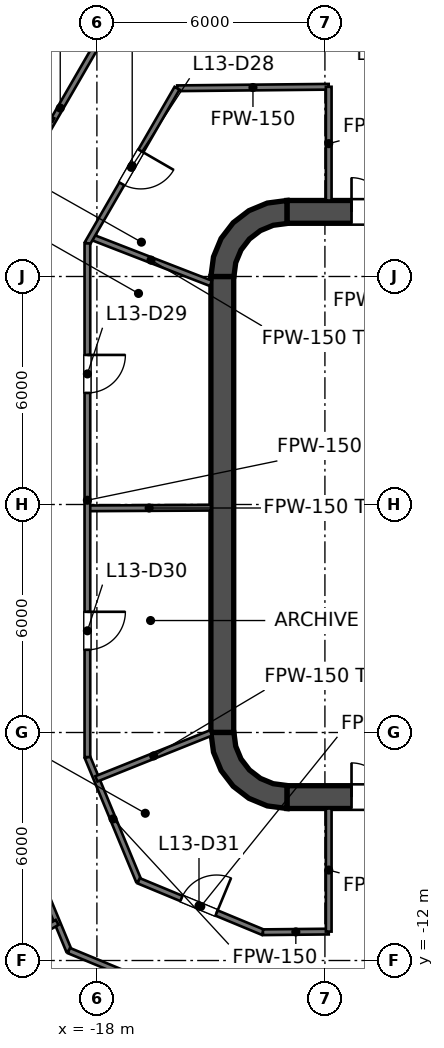
"""IFC4 building model, lengths in metres.
Left out: names, types, materials, properties, quantities, classifications, styles, units other than length and angle.
Written with IfcOpenShell. Run it as: python <this file> out.ifc"""

import sys

from ifc_helpers import new_model, si_unit, direction, frame, frame_2d, origin, place, context, subcontext, project, spatial, polyline, rectangle, outline, extrude, element, fill, save


model = new_model("IFC4")
c1 = context("Model", 3, precision=1e-05, world=origin(), true_north=direction((0.0, 1.0)))
c2 = subcontext(c1, "Body", "Model", "MODEL_VIEW")
j1 = project(units=[si_unit("LENGTHUNIT", "METRE"), si_unit("PLANEANGLEUNIT", "RADIAN")], contexts=[c1])
p1 = place(None, origin())
s1 = spatial("IfcSite", under=j1, at=p1, CompositionType="ELEMENT")
p2 = place(p1, origin())
s2 = spatial("IfcBuilding", under=s1, at=p2, CompositionType="ELEMENT")
p3 = place(p2, frame((0.0, 0.0, 75.6)))
s3 = spatial("IfcBuildingStorey", under=s2, at=p3, CompositionType="ELEMENT", Elevation=75.6)
p4 = place(p3, frame((-13.0, 7.7, 0.0), z_axis=(0.0, 0.0, 1.0), x_axis=(1.0, 0.0, 0.0)))
e1 = element("IfcWall", 1, at=p4, inside=s3, PredefinedType="SHEAR", context=c2, shape_type="SweptSolid", body=[
    extrude(rectangle(XDim=26.0, YDim=0.6, at=frame_2d((13.0, 0.0))), origin(), (0.0, 0.0, 1.0), 4.2),
])
p5 = place(p4, frame((1.7, 0.0, 0.0)))
e2 = element("IfcOpeningElement", 2, at=p5, cuts=e1, PredefinedType="OPENING", context=c2, shape_type="SweptSolid", body=[
    extrude(rectangle(XDim=1.8, YDim=2.1, at=frame_2d((0.9, 1.05))), frame((0.0, 0.3, 0.0), z_axis=(0.0, -1.0, 0.0), x_axis=(1.0, 0.0, 0.0)), (0.0, 0.0, 1.0), 0.6),
])
p6 = place(p4, frame((22.5, 0.0, 0.0)))
e3 = element("IfcOpeningElement", 3, at=p6, cuts=e1, PredefinedType="OPENING", context=c2, shape_type="SweptSolid", body=[
    extrude(rectangle(XDim=1.8, YDim=2.1, at=frame_2d((0.9, 1.05))), frame((0.0, 0.3, 0.0), z_axis=(0.0, -1.0, 0.0), x_axis=(1.0, 0.0, 0.0)), (0.0, 0.0, 1.0), 0.6),
])
p7 = place(p3, frame((-13.0, -7.7, 0.0), z_axis=(0.0, 0.0, 1.0), x_axis=(1.0, 0.0, 0.0)))
e4 = element("IfcWall", 4, at=p7, inside=s3, PredefinedType="SHEAR", context=c2, shape_type="SweptSolid", body=[
    extrude(rectangle(XDim=26.0, YDim=0.6, at=frame_2d((13.0, 0.0))), origin(), (0.0, 0.0, 1.0), 4.2),
])
p8 = place(p7, frame((1.7, 0.0, 0.0)))
e5 = element("IfcOpeningElement", 5, at=p8, cuts=e4, PredefinedType="OPENING", context=c2, shape_type="SweptSolid", body=[
    extrude(rectangle(XDim=1.8, YDim=2.1, at=frame_2d((0.9, 1.05))), frame((0.0, 0.3, 0.0), z_axis=(0.0, -1.0, 0.0), x_axis=(1.0, 0.0, 0.0)), (0.0, 0.0, 1.0), 0.6),
])
p9 = place(p7, frame((22.5, 0.0, 0.0)))
e6 = element("IfcOpeningElement", 6, at=p9, cuts=e4, PredefinedType="OPENING", context=c2, shape_type="SweptSolid", body=[
    extrude(rectangle(XDim=1.8, YDim=2.1, at=frame_2d((0.9, 1.05))), frame((0.0, 0.3, 0.0), z_axis=(0.0, -1.0, 0.0), x_axis=(1.0, 0.0, 0.0)), (0.0, 0.0, 1.0), 0.6),
])
p10 = place(p3, frame((-14.7, -6.0, 0.0), z_axis=(0.0, 0.0, 1.0), x_axis=(0.0, 1.0, 0.0)))
e7 = element("IfcWall", 7, at=p10, inside=s3, PredefinedType="SHEAR", context=c2, shape_type="SweptSolid", body=[
    extrude(rectangle(XDim=12.0, YDim=0.6, at=frame_2d((6.0, 0.0))), origin(), (0.0, 0.0, 1.0), 4.2),
])
p11 = place(p3, origin())
e8 = element("IfcWall", 8, at=p11, inside=s3, PredefinedType="SHEAR", context=c2, shape_type="SweptSolid", body=[
    extrude(outline(polyline([(-15.0, 6.0), (-14.395, 6.0), (-14.347, 6.361), (-14.208, 6.698), (-13.986, 6.986), (-13.698, 7.208), (-13.361, 7.347), (-13.0, 7.395), (-13.0, 8.0), (-13.518, 7.932), (-14.0, 7.732), (-14.414, 7.414), (-14.732, 7.0), (-14.932, 6.518), (-15.0, 6.0)])), origin(), (0.0, 0.0, 1.0), 4.2),
])
e9 = element("IfcWall", 9, at=p11, inside=s3, PredefinedType="SHEAR", context=c2, shape_type="SweptSolid", body=[
    extrude(outline(polyline([(-13.0, -8.0), (-13.0, -7.395), (-13.361, -7.347), (-13.698, -7.208), (-13.986, -6.986), (-14.208, -6.698), (-14.347, -6.361), (-14.395, -6.0), (-15.0, -6.0), (-14.932, -6.518), (-14.732, -7.0), (-14.414, -7.414), (-14.0, -7.732), (-13.518, -7.932), (-13.0, -8.0)])), origin(), (0.0, 0.0, 1.0), 4.2),
])
p12 = place(p3, frame((-11.8, -7.4, 0.0), z_axis=(0.0, 0.0, 1.0), x_axis=(0.0, 1.0, 0.0)))
e10 = element("IfcWall", 10, at=p12, inside=s3, PredefinedType="SOLIDWALL", context=c2, shape_type="SweptSolid", body=[
    extrude(rectangle(XDim=14.8, YDim=0.4, at=frame_2d((7.4, 0.0))), origin(), (0.0, 0.0, 1.0), 4.05),
])
p13 = place(p12, frame((11.2, 0.0, 0.0)))
e11 = element("IfcOpeningElement", 11, at=p13, cuts=e10, PredefinedType="OPENING", context=c2, shape_type="SweptSolid", body=[
    extrude(rectangle(XDim=1.1, YDim=2.1, at=frame_2d((0.55, 1.05))), frame((0.0, 0.2, 0.0), z_axis=(0.0, -1.0, 0.0), x_axis=(1.0, 0.0, 0.0)), (0.0, 0.0, 1.0), 0.4),
])
p14 = place(p12, frame((8.3, 0.0, 0.0)))
e12 = element("IfcOpeningElement", 12, at=p14, cuts=e10, PredefinedType="OPENING", context=c2, shape_type="SweptSolid", body=[
    extrude(rectangle(XDim=1.1, YDim=2.1, at=frame_2d((0.55, 1.05))), frame((0.0, 0.2, 0.0), z_axis=(0.0, -1.0, 0.0), x_axis=(1.0, 0.0, 0.0)), (0.0, 0.0, 1.0), 0.4),
])
p15 = place(p12, frame((5.4, 0.0, 0.0)))
e13 = element("IfcOpeningElement", 13, at=p15, cuts=e10, PredefinedType="OPENING", context=c2, shape_type="SweptSolid", body=[
    extrude(rectangle(XDim=1.1, YDim=2.1, at=frame_2d((0.55, 1.05))), frame((0.0, 0.2, 0.0), z_axis=(0.0, -1.0, 0.0), x_axis=(1.0, 0.0, 0.0)), (0.0, 0.0, 1.0), 0.4),
])
p16 = place(p12, frame((13.552, 0.0, 0.0)))
e14 = element("IfcOpeningElement", 14, at=p16, cuts=e10, PredefinedType="OPENING", context=c2, shape_type="SweptSolid", body=[
    extrude(rectangle(XDim=0.9, YDim=2.1, at=frame_2d((0.45, 1.05))), frame((0.0, 0.2, 0.0), z_axis=(0.0, -1.0, 0.0), x_axis=(1.0, 0.0, 0.0)), (0.0, 0.0, 1.0), 0.4),
])
p17 = place(p12, frame((0.347, 0.0, 0.0)))
e15 = element("IfcOpeningElement", 15, at=p17, cuts=e10, PredefinedType="OPENING", context=c2, shape_type="SweptSolid", body=[
    extrude(rectangle(XDim=0.9, YDim=2.1, at=frame_2d((0.45, 1.05))), frame((0.0, 0.2, 0.0), z_axis=(0.0, -1.0, 0.0), x_axis=(1.0, 0.0, 0.0)), (0.0, 0.0, 1.0), 0.4),
])
e16 = element("IfcWall", 16, at=p11, inside=s3, PredefinedType="SOLIDWALL", context=c2, shape_type="SweptSolid", body=[
    extrude(outline(polyline([(-12.0, -5.925), (-12.0, -5.675), (-14.15, -5.675), (-14.15, -3.025), (-12.0, -3.025), (-12.0, -2.775), (-14.15, -2.775), (-14.15, -0.125), (-12.0, -0.125), (-12.0, 0.125), (-14.15, 0.125), (-14.15, 2.775), (-12.0, 2.775), (-12.0, 3.025), (-14.15, 3.025), (-14.15, 5.675), (-12.0, 5.675), (-12.0, 5.925), (-14.15, 5.925), (-14.4, 5.925), (-14.4, 5.675), (-14.4, 3.025), (-14.4, 2.775), (-14.4, 0.125), (-14.4, -0.125), (-14.4, -2.775), (-14.4, -3.025), (-14.4, -5.675), (-14.4, -5.925), (-14.15, -5.925), (-12.0, -5.925)])), origin(), (0.0, 0.0, 1.0), 4.05),
])
p18 = place(p3, frame((-20.65, -7.124, 0.0), z_axis=(0.0, 0.0, 1.0), x_axis=(0.382941772901, -0.923772482036, 0.0)))
e17 = element("IfcWall", 17, at=p18, inside=s3, PredefinedType="PARTITIONING", context=c2, shape_type="SweptSolid", body=[
    extrude(rectangle(XDim=4.994, YDim=0.15, at=frame_2d((2.497, 0.0))), origin(), (0.0, 0.0, 1.0), 3.195),
])
p19 = place(p18, frame((1.95, 0.0, 0.0)))
e18 = element("IfcOpeningElement", 18, at=p19, cuts=e17, PredefinedType="OPENING", context=c2, shape_type="SweptSolid", body=[
    extrude(rectangle(XDim=1.0, YDim=2.1, at=frame_2d((0.5, 1.05))), frame((0.0, 0.075, 0.0), z_axis=(0.0, -1.0, 0.0), x_axis=(1.0, 0.0, 0.0)), (0.0, 0.0, 1.0), 0.15),
])
p20 = place(p3, frame((-18.25, -6.647, 0.0), z_axis=(0.0, 0.0, 1.0), x_axis=(0.383000597973, -0.923748094424, 0.0)))
e19 = element("IfcWall", 19, at=p20, inside=s3, PredefinedType="PARTITIONING", context=c2, shape_type="SweptSolid", body=[
    extrude(rectangle(XDim=3.522, YDim=0.15, at=frame_2d((1.761, 0.0))), origin(), (0.0, 0.0, 1.0), 3.195),
])
p21 = place(p3, frame((-18.738, -11.738, 0.0), z_axis=(0.0, 0.0, 1.0), x_axis=(0.923848598814, -0.38275810438, 0.0)))
e20 = element("IfcWall", 20, at=p21, inside=s3, PredefinedType="PARTITIONING", context=c2, shape_type="SweptSolid", body=[
    extrude(rectangle(XDim=5.024, YDim=0.15, at=frame_2d((2.512, 0.0))), origin(), (0.0, 0.0, 1.0), 3.195),
])
p22 = place(p21, frame((2.012, 0.0, 0.0)))
e21 = element("IfcOpeningElement", 21, at=p22, cuts=e20, PredefinedType="OPENING", context=c2, shape_type="SweptSolid", body=[
    extrude(rectangle(XDim=1.0, YDim=2.1, at=frame_2d((0.5, 1.05))), frame((0.0, 0.075, 0.0), z_axis=(0.0, -1.0, 0.0), x_axis=(1.0, 0.0, 0.0)), (0.0, 0.0, 1.0), 0.15),
])
p23 = place(p3, frame((-16.901, -9.901, 0.0), z_axis=(0.0, 0.0, 1.0), x_axis=(0.923795674736, -0.382885820239, 0.0)))
e22 = element("IfcWall", 22, at=p23, inside=s3, PredefinedType="PARTITIONING", context=c2, shape_type="SweptSolid", body=[
    extrude(rectangle(XDim=3.54, YDim=0.15, at=frame_2d((1.77, 0.0))), origin(), (0.0, 0.0, 1.0), 3.195),
])
p24 = place(p23, frame((1.219, 0.0, 0.0)))
e23 = element("IfcOpeningElement", 23, at=p24, cuts=e22, PredefinedType="OPENING", context=c2, shape_type="SweptSolid", body=[
    extrude(rectangle(XDim=1.0, YDim=2.1, at=frame_2d((0.5, 1.05))), frame((0.0, 0.075, 0.0), z_axis=(0.0, -1.0, 0.0), x_axis=(1.0, 0.0, 0.0)), (0.0, 0.0, 1.0), 0.15),
])
p25 = place(p3, frame((-18.151, 7.042, 0.0), z_axis=(0.0, 0.0, 1.0), x_axis=(0.93232154811, -0.361630378881, 0.0)))
e24 = element("IfcWall", 24, at=p25, inside=s3, PredefinedType="PARTITIONING", context=c2, shape_type="SweptSolid", body=[
    extrude(rectangle(XDim=3.38, YDim=0.15, at=frame_2d((1.69, 0.0))), origin(), (0.0, 0.0, 1.0), 4.05),
])
p26 = place(p3, frame((-18.25, -0.101, 0.0), z_axis=(0.0, 0.0, 1.0), x_axis=(0.999985777013, 0.005333457795, 0.0)))
e25 = element("IfcWall", 25, at=p26, inside=s3, PredefinedType="PARTITIONING", context=c2, shape_type="SweptSolid", body=[
    extrude(rectangle(XDim=3.25, YDim=0.15, at=frame_2d((1.625, 0.0))), origin(), (0.0, 0.0, 1.0), 3.118),
])
p27 = place(p3, frame((-13.631, -11.256, 0.0), z_axis=(0.0, 0.0, 1.0), x_axis=(0.999949876767, 0.010012190276, 0.0)))
e26 = element("IfcWall", 26, at=p27, inside=s3, PredefinedType="PARTITIONING", context=c2, shape_type="SweptSolid", body=[
    extrude(rectangle(XDim=1.731, YDim=0.15, at=frame_2d((0.866, 0.0))), origin(), (0.0, 0.0, 1.0), 4.05),
])
p28 = place(p3, frame((-15.887, 10.953, 0.0), z_axis=(0.0, 0.0, 1.0), x_axis=(0.999950802569, 0.009919296431, 0.0)))
e27 = element("IfcWall", 27, at=p28, inside=s3, PredefinedType="PARTITIONING", context=c2, shape_type="SweptSolid", body=[
    extrude(rectangle(XDim=3.987, YDim=0.15, at=frame_2d((1.994, 0.0))), origin(), (0.0, 0.0, 1.0), 3.195),
])
p29 = place(p3, frame((-18.013, -7.219, 0.0), z_axis=(0.0, 0.0, 1.0), x_axis=(0.928305468463, 0.371818446586, 0.0)))
e28 = element("IfcWall", 28, at=p29, inside=s3, PredefinedType="PARTITIONING", context=c2, shape_type="SweptSolid", body=[
    extrude(rectangle(XDim=3.247, YDim=0.15, at=frame_2d((1.624, 0.0))), origin(), (0.0, 0.0, 1.0), 4.05),
])
p30 = place(p3, frame((-24.859, -14.352, 0.0), z_axis=(0.0, 0.0, 1.0), x_axis=(0.866036584562, 0.499980633826, 0.0)))
e29 = element("IfcWall", 29, at=p30, inside=s3, PredefinedType="PARTITIONING", context=c2, shape_type="SweptSolid", body=[
    extrude(rectangle(XDim=6.712, YDim=0.15, at=frame_2d((3.356, 0.0))), origin(), (0.0, 0.0, 1.0), 3.276),
])
p31 = place(p3, frame((-18.25, 6.871, 0.0), z_axis=(0.0, 0.0, 1.0), x_axis=(0.500254304961, 0.865878530955, 0.0)))
e30 = element("IfcWall", 30, at=p31, inside=s3, PredefinedType="PARTITIONING", context=c2, shape_type="SweptSolid", body=[
    extrude(rectangle(XDim=4.715, YDim=0.15, at=frame_2d((2.357, 0.0))), origin(), (0.0, 0.0, 1.0), 3.195),
])
p32 = place(p31, frame((1.81, 0.0, 0.0)))
e31 = element("IfcOpeningElement", 31, at=p32, cuts=e30, PredefinedType="OPENING", context=c2, shape_type="SweptSolid", body=[
    extrude(rectangle(XDim=1.0, YDim=2.1, at=frame_2d((0.5, 1.05))), frame((0.0, 0.075, 0.0), z_axis=(0.0, -1.0, 0.0), x_axis=(1.0, 0.0, 0.0)), (0.0, 0.0, 1.0), 0.15),
])
p33 = place(p3, frame((-20.65, 7.514, 0.0), z_axis=(0.0, 0.0, 1.0), x_axis=(0.500199125334, 0.865910408192, 0.0)))
e32 = element("IfcWall", 32, at=p33, inside=s3, PredefinedType="PARTITIONING", context=c2, shape_type="SweptSolid", body=[
    extrude(rectangle(XDim=6.739, YDim=0.15, at=frame_2d((3.369, 0.0))), origin(), (0.0, 0.0, 1.0), 3.195),
])
p34 = place(p33, frame((1.01, 0.0, 0.0)))
e33 = element("IfcOpeningElement", 33, at=p34, cuts=e32, PredefinedType="OPENING", context=c2, shape_type="SweptSolid", body=[
    extrude(rectangle(XDim=1.0, YDim=2.1, at=frame_2d((0.5, 1.05))), frame((0.0, 0.075, 0.0), z_axis=(0.0, -1.0, 0.0), x_axis=(1.0, 0.0, 0.0)), (0.0, 0.0, 1.0), 0.15),
])
p35 = place(p3, frame((-11.9, -11.239, 0.0), z_axis=(0.0, 0.0, 1.0), x_axis=(0.0, 1.0, 0.0)))
e34 = element("IfcWall", 34, at=p35, inside=s3, PredefinedType="PARTITIONING", context=c2, shape_type="SweptSolid", body=[
    extrude(rectangle(XDim=3.239, YDim=0.15, at=frame_2d((1.62, 0.0))), origin(), (0.0, 0.0, 1.0), 3.195),
])
p36 = place(p3, frame((-11.9, 8.0, 0.0), z_axis=(0.0, 0.0, 1.0), x_axis=(0.0, 1.0, 0.0)))
e35 = element("IfcWall", 35, at=p36, inside=s3, PredefinedType="PARTITIONING", context=c2, shape_type="SweptSolid", body=[
    extrude(rectangle(XDim=2.992, YDim=0.15, at=frame_2d((1.496, 0.0))), origin(), (0.0, 0.0, 1.0), 3.195),
])
p37 = place(p3, frame((-18.25, -6.647, 0.0), z_axis=(0.0, 0.0, 1.0), x_axis=(0.0, 1.0, 0.0)))
e36 = element("IfcWall", 36, at=p37, inside=s3, PredefinedType="PARTITIONING", context=c2, shape_type="SweptSolid", body=[
    extrude(rectangle(XDim=13.518, YDim=0.15, at=frame_2d((6.759, 0.0))), origin(), (0.0, 0.0, 1.0), 3.118),
])
p38 = place(p37, frame((9.583, 0.0, 0.0)))
e37 = element("IfcOpeningElement", 37, at=p38, cuts=e36, PredefinedType="OPENING", context=c2, shape_type="SweptSolid", body=[
    extrude(rectangle(XDim=1.0, YDim=2.1, at=frame_2d((0.5, 1.05))), frame((0.0, 0.075, 0.0), z_axis=(0.0, -1.0, 0.0), x_axis=(1.0, 0.0, 0.0)), (0.0, 0.0, 1.0), 0.15),
])
p39 = place(p37, frame((2.823, 0.0, 0.0)))
e38 = element("IfcOpeningElement", 38, at=p39, cuts=e36, PredefinedType="OPENING", context=c2, shape_type="SweptSolid", body=[
    extrude(rectangle(XDim=1.0, YDim=2.1, at=frame_2d((0.5, 1.05))), frame((0.0, 0.075, 0.0), z_axis=(0.0, -1.0, 0.0), x_axis=(1.0, 0.0, 0.0)), (0.0, 0.0, 1.0), 0.15),
])
p40 = place(p3, frame((-22.004, 11.629, 0.0), z_axis=(0.0, 0.0, 1.0), x_axis=(0.884171604481, -0.467162256426, 0.0)))
e39 = element("IfcWall", 39, at=p40, inside=s3, PredefinedType="PARTITIONING", context=c2, shape_type="SweptSolid", body=[
    extrude(rectangle(XDim=3.232, YDim=0.1, at=frame_2d((1.616, 0.0))), origin(), (0.0, 0.0, 1.0), 4.05),
])
p41 = place(p3, frame((-23.88, 8.379, 0.0), z_axis=(0.0, 0.0, 1.0), x_axis=(0.499871577197, 0.86609953603, 0.0)))
e40 = element("IfcWall", 40, at=p41, inside=s3, PredefinedType="PARTITIONING", context=c2, shape_type="SweptSolid", body=[
    extrude(rectangle(XDim=9.448, YDim=0.1, at=frame_2d((4.724, 0.0))), origin(), (0.0, 0.0, 1.0), 3.195),
])
p42 = place(p41, frame((4.325, 0.0, 0.0)))
e41 = element("IfcOpeningElement", 41, at=p42, cuts=e40, PredefinedType="OPENING", context=c2, shape_type="SweptSolid", body=[
    extrude(rectangle(XDim=0.9, YDim=2.1, at=frame_2d((0.45, 1.05))), frame((0.0, 0.05, 0.0), z_axis=(0.0, -1.0, 0.0), x_axis=(1.0, 0.0, 0.0)), (0.0, 0.0, 1.0), 0.1),
])
p43 = place(p13, origin())
e42 = element("IfcDoor", 42, at=p43, inside=s3, OperationType="DOUBLE_DOOR_SLIDING", PredefinedType="DOOR", context=c2, shape_type="SweptSolid", body=[
    extrude(rectangle(XDim=1.1, YDim=2.1, at=frame_2d((0.55, 1.05))), frame((0.0, 0.025, 0.0), z_axis=(0.0, -1.0, 0.0), x_axis=(1.0, 0.0, 0.0)), (0.0, 0.0, 1.0), 0.05),
])
fill(e11, e42)
p44 = place(p14, origin())
e43 = element("IfcDoor", 43, at=p44, inside=s3, OperationType="DOUBLE_DOOR_SLIDING", PredefinedType="DOOR", context=c2, shape_type="SweptSolid", body=[
    extrude(rectangle(XDim=1.1, YDim=2.1, at=frame_2d((0.55, 1.05))), frame((0.0, 0.025, 0.0), z_axis=(0.0, -1.0, 0.0), x_axis=(1.0, 0.0, 0.0)), (0.0, 0.0, 1.0), 0.05),
])
fill(e12, e43)
p45 = place(p15, origin())
e44 = element("IfcDoor", 44, at=p45, inside=s3, OperationType="DOUBLE_DOOR_SLIDING", PredefinedType="DOOR", context=c2, shape_type="SweptSolid", body=[
    extrude(rectangle(XDim=1.1, YDim=2.1, at=frame_2d((0.55, 1.05))), frame((0.0, 0.025, 0.0), z_axis=(0.0, -1.0, 0.0), x_axis=(1.0, 0.0, 0.0)), (0.0, 0.0, 1.0), 0.05),
])
fill(e13, e44)
p46 = place(p16, origin())
e45 = element("IfcDoor", 45, at=p46, inside=s3, OperationType="SINGLE_SWING_LEFT", PredefinedType="DOOR", context=c2, shape_type="SweptSolid", body=[
    extrude(rectangle(XDim=0.9, YDim=2.1, at=frame_2d((0.45, 1.05))), frame((0.0, 0.025, 0.0), z_axis=(0.0, -1.0, 0.0), x_axis=(1.0, 0.0, 0.0)), (0.0, 0.0, 1.0), 0.05),
])
fill(e14, e45)
p47 = place(p17, origin())
e46 = element("IfcDoor", 46, at=p47, inside=s3, OperationType="SINGLE_SWING_LEFT", PredefinedType="DOOR", context=c2, shape_type="SweptSolid", body=[
    extrude(rectangle(XDim=0.9, YDim=2.1, at=frame_2d((0.45, 1.05))), frame((0.0, 0.025, 0.0), z_axis=(0.0, -1.0, 0.0), x_axis=(1.0, 0.0, 0.0)), (0.0, 0.0, 1.0), 0.05),
])
fill(e15, e46)
p48 = place(p5, origin())
e47 = element("IfcDoor", 47, at=p48, inside=s3, OperationType="DOUBLE_DOOR_SINGLE_SWING", PredefinedType="DOOR", context=c2, shape_type="SweptSolid", body=[
    extrude(rectangle(XDim=1.8, YDim=2.1, at=frame_2d((0.9, 1.05))), frame((0.0, 0.025, 0.0), z_axis=(0.0, -1.0, 0.0), x_axis=(1.0, 0.0, 0.0)), (0.0, 0.0, 1.0), 0.05),
])
fill(e2, e47)
p49 = place(p8, origin())
e48 = element("IfcDoor", 48, at=p49, inside=s3, OperationType="DOUBLE_DOOR_SINGLE_SWING", PredefinedType="DOOR", context=c2, shape_type="SweptSolid", body=[
    extrude(rectangle(XDim=1.8, YDim=2.1, at=frame_2d((0.9, 1.05))), frame((0.0, 0.025, 0.0), z_axis=(0.0, -1.0, 0.0), x_axis=(1.0, 0.0, 0.0)), (0.0, 0.0, 1.0), 0.05),
])
fill(e5, e48)
p50 = place(p32, origin())
e49 = element("IfcDoor", 49, at=p50, inside=s3, OperationType="SINGLE_SWING_RIGHT", PredefinedType="DOOR", context=c2, shape_type="SweptSolid", body=[
    extrude(rectangle(XDim=1.0, YDim=2.1, at=frame_2d((0.5, 1.05))), frame((0.0, 0.025, 0.0), z_axis=(0.0, -1.0, 0.0), x_axis=(1.0, 0.0, 0.0)), (0.0, 0.0, 1.0), 0.05),
])
fill(e31, e49)
p51 = place(p38, origin())
e50 = element("IfcDoor", 50, at=p51, inside=s3, OperationType="SINGLE_SWING_RIGHT", PredefinedType="DOOR", context=c2, shape_type="SweptSolid", body=[
    extrude(rectangle(XDim=1.0, YDim=2.1, at=frame_2d((0.5, 1.05))), frame((0.0, 0.025, 0.0), z_axis=(0.0, -1.0, 0.0), x_axis=(1.0, 0.0, 0.0)), (0.0, 0.0, 1.0), 0.05),
])
fill(e37, e50)
p52 = place(p39, origin())
e51 = element("IfcDoor", 51, at=p52, inside=s3, OperationType="SINGLE_SWING_RIGHT", PredefinedType="DOOR", context=c2, shape_type="SweptSolid", body=[
    extrude(rectangle(XDim=1.0, YDim=2.1, at=frame_2d((0.5, 1.05))), frame((0.0, 0.025, 0.0), z_axis=(0.0, -1.0, 0.0), x_axis=(1.0, 0.0, 0.0)), (0.0, 0.0, 1.0), 0.05),
])
fill(e38, e51)
p53 = place(p24, origin())
e52 = element("IfcDoor", 52, at=p53, inside=s3, OperationType="SINGLE_SWING_RIGHT", PredefinedType="DOOR", context=c2, shape_type="SweptSolid", body=[
    extrude(rectangle(XDim=1.0, YDim=2.1, at=frame_2d((0.5, 1.05))), frame((0.0, 0.025, 0.0), z_axis=(0.0, -1.0, 0.0), x_axis=(1.0, 0.0, 0.0)), (0.0, 0.0, 1.0), 0.05),
])
fill(e23, e52)
save(model, sys.argv[1])
